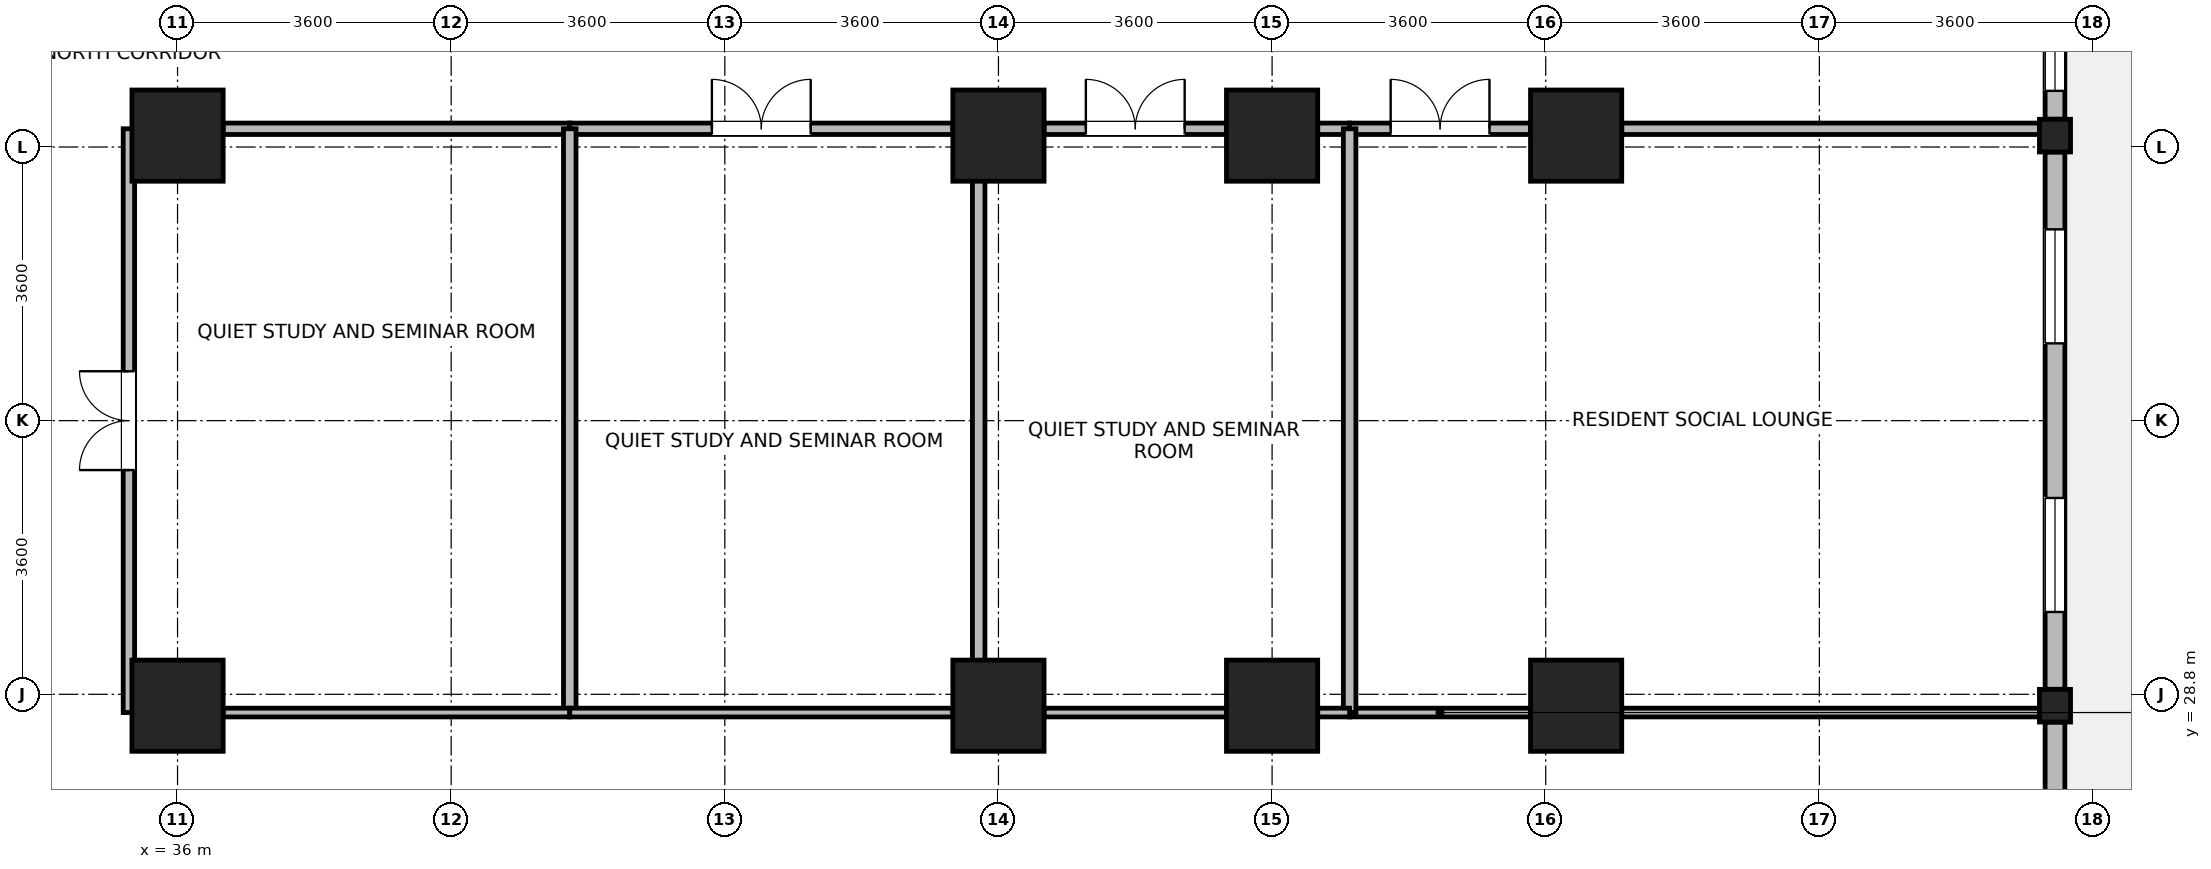
"""IFC4 building model, lengths in metres.
Left out: names, types, materials, properties, quantities, classifications, styles, units other than length and angle.
Written with IfcOpenShell. Run it as: python <this file> out.ifc"""

import sys

from ifc_helpers import new_model, si_unit, direction, frame, frame_2d, origin, origin_2d, place, context, subcontext, project, spatial, rectangle, i_section, extrude, source, transform, mapped, element, fill, save


model = new_model("IFC4")
c1 = context("Model", 3, precision=1e-05, world=origin(), true_north=direction((0.0, 1.0)))
c2 = subcontext(c1, "Body", "Model", "MODEL_VIEW")
j1 = project(units=[si_unit("LENGTHUNIT", "METRE"), si_unit("PLANEANGLEUNIT", "RADIAN")], contexts=[c1])
p1 = place(None, origin())
s1 = spatial("IfcSite", under=j1, at=p1, CompositionType="ELEMENT")
p2 = place(p1, origin())
s2 = spatial("IfcBuilding", under=s1, at=p2, CompositionType="ELEMENT")
p3 = place(p2, frame((0.0, 0.0, 119.3)))
s3 = spatial("IfcBuildingStorey", under=s2, at=p3, CompositionType="ELEMENT", Elevation=119.3)
m1 = source(origin(), c2, "Body", "SweptSolid", [
    extrude(rectangle(XDim=1.2, YDim=1.2, at=origin_2d()), origin(), (0.0, 0.0, 1.0), 3.7),
])
for number, where, z_axis, x_axis in (
    (1, (36.0, 28.65, 0.0), (0.0, 0.0, 1.0), (1.0, 0.0, 0.0)),
    (2, (36.0, 36.15, 0.0), (0.0, 0.0, 1.0), (1.0, 0.0, 0.0)),
    (3, (46.8, 28.65, 0.0), (0.0, 0.0, 1.0), (1.0, 0.0, 0.0)),
    (4, (46.8, 36.15, 0.0), (0.0, 0.0, 1.0), (1.0, 0.0, 0.0)),
    (5, (50.4, 28.65, 0.0), (0.0, 0.0, 1.0), (1.0, 0.0, 0.0)),
    (6, (50.4, 36.15, 0.0), (0.0, 0.0, 1.0), (1.0, 0.0, 0.0)),
    (7, (54.4, 28.65, 0.0), (0.0, 0.0, 1.0), (1.0, 0.0, 0.0)),
    (8, (54.4, 36.15, 0.0), (0.0, 0.0, 1.0), (1.0, 0.0, 0.0)),
):
    element("IfcColumn", number, at=place(p3, frame(where, z_axis=z_axis, x_axis=x_axis)), inside=s3, PredefinedType="COLUMN", context=c2, shape_type="MappedRepresentation", body=[
        mapped(m1, transform((0.0, 0.0, 0.0), x_axis=(1.0, 0.0, 0.0), y_axis=(0.0, 1.0, 0.0), z_axis=(0.0, 0.0, 1.0), scale=1.0)),
    ])
m2 = source(origin(), c2, "Body", "SweptSolid", [
    extrude(i_section(OverallWidth=0.409, OverallDepth=0.43, WebThickness=0.024, FlangeThickness=0.033, FilletRadius=0.015, at=origin_2d()), origin(), (0.0, 0.0, 1.0), 3.7),
])
for number, where, z_axis, x_axis in (
    (9, (60.7, 28.65, 0.0), (0.0, 0.0, 1.0), (1.0, 0.0, 0.0)),
    (10, (60.7, 36.15, 0.0), (0.0, 0.0, 1.0), (1.0, 0.0, 0.0)),
):
    element("IfcColumn", number, at=place(p3, frame(where, z_axis=z_axis, x_axis=x_axis)), inside=s3, PredefinedType="COLUMN", context=c2, shape_type="MappedRepresentation", body=[
        mapped(m2, transform((0.0, 0.0, 0.0), x_axis=(1.0, 0.0, 0.0), y_axis=(0.0, 1.0, 0.0), z_axis=(0.0, 0.0, 1.0), scale=1.0)),
    ])
p4 = place(p3, frame((60.7, 28.434, 0.0), z_axis=(0.0, 0.0, 1.0), x_axis=(0.0, -1.0, 0.0)))
e11 = element("IfcWall", 11, at=p4, inside=s3, PredefinedType="STANDARD", context=c2, shape_type="SweptSolid", body=[
    extrude(rectangle(XDim=6.618, YDim=0.26, at=frame_2d((3.309, 0.0))), origin(), (0.0, 0.0, 1.0), 2.98),
])
p5 = place(p4, frame((4.213, 0.0, 0.85)))
e12 = element("IfcOpeningElement", 12, at=p5, cuts=e11, PredefinedType="OPENING", context=c2, shape_type="SweptSolid", body=[
    extrude(rectangle(XDim=1.5, YDim=1.85, at=frame_2d((0.75, 0.925))), frame((0.0, 0.14, 0.0), z_axis=(0.0, -1.0, 0.0), x_axis=(1.0, 0.0, 0.0)), (0.0, 0.0, 1.0), 0.28),
])
p6 = place(p4, frame((2.834, 0.0, 0.85)))
e13 = element("IfcOpeningElement", 13, at=p6, cuts=e11, PredefinedType="OPENING", context=c2, shape_type="SweptSolid", body=[
    extrude(rectangle(XDim=0.95, YDim=1.75, at=frame_2d((0.475, 0.875))), frame((0.0, 0.14, 0.0), z_axis=(0.0, -1.0, 0.0), x_axis=(1.0, 0.0, 0.0)), (0.0, 0.0, 1.0), 0.28),
])
p7 = place(p3, frame((60.7, 35.934, 0.0), z_axis=(0.0, 0.0, 1.0), x_axis=(0.0, -1.0, 0.0)))
e14 = element("IfcWall", 14, at=p7, inside=s3, PredefinedType="STANDARD", context=c2, shape_type="SweptSolid", body=[
    extrude(rectangle(XDim=7.068, YDim=0.26, at=frame_2d((3.534, 0.0))), origin(), (0.0, 0.0, 1.0), 2.98),
])
p8 = place(p7, frame((1.017, 0.0, 0.85)))
e15 = element("IfcOpeningElement", 15, at=p8, cuts=e14, PredefinedType="OPENING", context=c2, shape_type="SweptSolid", body=[
    extrude(rectangle(XDim=1.5, YDim=1.85, at=frame_2d((0.75, 0.925))), frame((0.0, 0.14, 0.0), z_axis=(0.0, -1.0, 0.0), x_axis=(1.0, 0.0, 0.0)), (0.0, 0.0, 1.0), 0.28),
])
p9 = place(p7, frame((4.551, 0.0, 0.85)))
e16 = element("IfcOpeningElement", 16, at=p9, cuts=e14, PredefinedType="OPENING", context=c2, shape_type="SweptSolid", body=[
    extrude(rectangle(XDim=1.5, YDim=1.85, at=frame_2d((0.75, 0.925))), frame((0.0, 0.14, 0.0), z_axis=(0.0, -1.0, 0.0), x_axis=(1.0, 0.0, 0.0)), (0.0, 0.0, 1.0), 0.28),
])
p10 = place(p3, frame((60.7, 39.73, 0.0), z_axis=(0.0, 0.0, 1.0), x_axis=(0.0, -1.0, 0.0)))
e17 = element("IfcWall", 17, at=p10, inside=s3, PredefinedType="STANDARD", context=c2, shape_type="SweptSolid", body=[
    extrude(rectangle(XDim=3.364, YDim=0.26, at=frame_2d((1.682, 0.0))), origin(), (0.0, 0.0, 1.0), 3.43),
])
p11 = place(p10, frame((2.041, 0.0, 0.85)))
e18 = element("IfcOpeningElement", 18, at=p11, cuts=e17, PredefinedType="OPENING", context=c2, shape_type="SweptSolid", body=[
    extrude(rectangle(XDim=0.95, YDim=1.75, at=frame_2d((0.475, 0.875))), frame((0.0, 0.14, 0.0), z_axis=(0.0, -1.0, 0.0), x_axis=(1.0, 0.0, 0.0)), (0.0, 0.0, 1.0), 0.28),
])
p12 = place(p10, frame((0.265, 0.0, 0.85)))
e19 = element("IfcOpeningElement", 19, at=p12, cuts=e17, PredefinedType="OPENING", context=c2, shape_type="SweptSolid", body=[
    extrude(rectangle(XDim=0.95, YDim=1.75, at=frame_2d((0.475, 0.875))), frame((0.0, 0.14, 0.0), z_axis=(0.0, -1.0, 0.0), x_axis=(1.0, 0.0, 0.0)), (0.0, 0.0, 1.0), 0.28),
])
p13 = place(p3, frame((51.42, 36.24, 0.0), z_axis=(0.0, 0.0, 1.0), x_axis=(1.0, 0.0, 0.0)))
e20 = element("IfcWall", 20, at=p13, inside=s3, PredefinedType="PARTITIONING", context=c2, shape_type="SweptSolid", body=[
    extrude(rectangle(XDim=2.38, YDim=0.15, at=frame_2d((1.19, 0.0))), origin(), (0.0, 0.0, 1.0), 2.78),
])
p14 = place(p13, frame((0.54, 0.0, 0.0)))
e21 = element("IfcOpeningElement", 21, at=p14, cuts=e20, PredefinedType="OPENING", context=c2, shape_type="SweptSolid", body=[
    extrude(rectangle(XDim=1.3, YDim=2.12, at=frame_2d((0.65, 1.06))), frame((0.0, 0.085, 0.0), z_axis=(0.0, -1.0, 0.0), x_axis=(1.0, 0.0, 0.0)), (0.0, 0.0, 1.0), 0.17),
])
p15 = place(p3, frame((55.0, 36.24, 0.0), z_axis=(0.0, 0.0, 1.0), x_axis=(1.0, 0.0, 0.0)))
e22 = element("IfcWall", 22, at=p15, inside=s3, PredefinedType="PARTITIONING", context=c2, shape_type="SweptSolid", body=[
    extrude(rectangle(XDim=5.496, YDim=0.15, at=frame_2d((2.748, 0.0))), origin(), (0.0, 0.0, 1.0), 2.78),
])
p16 = place(p3, frame((35.36, 28.56, 0.0), z_axis=(0.0, 0.0, 1.0), x_axis=(0.0, 1.0, 0.0)))
e23 = element("IfcWall", 23, at=p16, inside=s3, PredefinedType="PARTITIONING", context=c2, shape_type="SweptSolid", body=[
    extrude(rectangle(XDim=7.68, YDim=0.15, at=frame_2d((3.84, 0.0))), origin(), (0.0, 0.0, 1.0), 3.43),
])
p17 = place(p16, frame((3.19, 0.0, 0.0)))
e24 = element("IfcOpeningElement", 24, at=p17, cuts=e23, PredefinedType="OPENING", context=c2, shape_type="SweptSolid", body=[
    extrude(rectangle(XDim=1.3, YDim=2.12, at=frame_2d((0.65, 1.06))), frame((0.0, 0.085, 0.0), z_axis=(0.0, -1.0, 0.0), x_axis=(1.0, 0.0, 0.0)), (0.0, 0.0, 1.0), 0.17),
])
p18 = place(p3, frame((36.6, 36.24, 0.0), z_axis=(0.0, 0.0, 1.0), x_axis=(1.0, 0.0, 0.0)))
e25 = element("IfcWall", 25, at=p18, inside=s3, PredefinedType="PARTITIONING", context=c2, shape_type="SweptSolid", body=[
    extrude(rectangle(XDim=4.56, YDim=0.15, at=frame_2d((2.28, 0.0))), origin(), (0.0, 0.0, 1.0), 2.78),
])
p19 = place(p3, frame((41.16, 36.24, 0.0), z_axis=(0.0, 0.0, 1.0), x_axis=(1.0, 0.0, 0.0)))
e26 = element("IfcWall", 26, at=p19, inside=s3, PredefinedType="PARTITIONING", context=c2, shape_type="SweptSolid", body=[
    extrude(rectangle(XDim=5.04, YDim=0.15, at=frame_2d((2.52, 0.0))), origin(), (0.0, 0.0, 1.0), 2.78),
])
p20 = place(p19, frame((1.87, 0.0, 0.0)))
e27 = element("IfcOpeningElement", 27, at=p20, cuts=e26, PredefinedType="OPENING", context=c2, shape_type="SweptSolid", body=[
    extrude(rectangle(XDim=1.3, YDim=2.12, at=frame_2d((0.65, 1.06))), frame((0.0, 0.085, 0.0), z_axis=(0.0, -1.0, 0.0), x_axis=(1.0, 0.0, 0.0)), (0.0, 0.0, 1.0), 0.17),
])
p21 = place(p3, frame((47.4, 36.24, 0.0), z_axis=(0.0, 0.0, 1.0), x_axis=(1.0, 0.0, 0.0)))
e28 = element("IfcWall", 28, at=p21, inside=s3, PredefinedType="PARTITIONING", context=c2, shape_type="SweptSolid", body=[
    extrude(rectangle(XDim=2.4, YDim=0.15, at=frame_2d((1.2, 0.0))), origin(), (0.0, 0.0, 1.0), 2.78),
])
p22 = place(p21, frame((0.55, 0.0, 0.0)))
e29 = element("IfcOpeningElement", 29, at=p22, cuts=e28, PredefinedType="OPENING", context=c2, shape_type="SweptSolid", body=[
    extrude(rectangle(XDim=1.3, YDim=2.12, at=frame_2d((0.65, 1.06))), frame((0.0, 0.085, 0.0), z_axis=(0.0, -1.0, 0.0), x_axis=(1.0, 0.0, 0.0)), (0.0, 0.0, 1.0), 0.17),
])
p23 = place(p3, frame((51.0, 36.24, 0.0), z_axis=(0.0, 0.0, 1.0), x_axis=(1.0, 0.0, 0.0)))
e30 = element("IfcWall", 30, at=p23, inside=s3, PredefinedType="PARTITIONING", context=c2, shape_type="SweptSolid", body=[
    extrude(rectangle(XDim=0.42, YDim=0.15, at=frame_2d((0.21, 0.0))), origin(), (0.0, 0.0, 1.0), 2.78),
])
p24 = place(p3, frame((51.42, 28.56, 0.0), z_axis=(0.0, 0.0, 1.0), x_axis=(1.0, 0.0, 0.0)))
e31 = element("IfcWall", 31, at=p24, inside=s3, PredefinedType="PARTITIONING", context=c2, shape_type="SweptSolid", body=[
    extrude(rectangle(XDim=2.38, YDim=0.115, at=frame_2d((1.19, 0.0))), origin(), (0.0, 0.0, 1.0), 2.78),
])
p25 = place(p3, frame((55.0, 28.56, 0.0), z_axis=(0.0, 0.0, 1.0), x_axis=(1.0, 0.0, 0.0)))
e32 = element("IfcWall", 32, at=p25, inside=s3, PredefinedType="PARTITIONING", context=c2, shape_type="SweptSolid", body=[
    extrude(rectangle(XDim=5.496, YDim=0.115, at=frame_2d((2.748, 0.0))), origin(), (0.0, 0.0, 1.0), 2.78),
])
for number, where, z_axis, x_axis in (
    (33, (41.16, 28.56, 0.0), (0.0, 0.0, 1.0), (0.0, 1.0, 0.0)),
    (34, (46.54, 28.56, 0.0), (0.0, 0.0, 1.0), (0.0, 1.0, 0.0)),
    (35, (51.42, 28.56, 0.0), (0.0, 0.0, 1.0), (0.0, 1.0, 0.0)),
):
    element("IfcWall", number, at=place(p3, frame(where, z_axis=z_axis, x_axis=x_axis)), inside=s3, PredefinedType="PARTITIONING", context=c2, shape_type="SweptSolid", body=[
        extrude(rectangle(XDim=7.68, YDim=0.165, at=frame_2d((3.84, 0.0))), origin(), (0.0, 0.0, 1.0), 3.43),
    ])
p26 = place(p3, frame((36.6, 28.56, 0.0), z_axis=(0.0, 0.0, 1.0), x_axis=(1.0, 0.0, 0.0)))
e36 = element("IfcWall", 36, at=p26, inside=s3, PredefinedType="PARTITIONING", context=c2, shape_type="SweptSolid", body=[
    extrude(rectangle(XDim=4.56, YDim=0.115, at=frame_2d((2.28, 0.0))), origin(), (0.0, 0.0, 1.0), 2.78),
])
p27 = place(p3, frame((41.16, 28.56, 0.0), z_axis=(0.0, 0.0, 1.0), x_axis=(1.0, 0.0, 0.0)))
e37 = element("IfcWall", 37, at=p27, inside=s3, PredefinedType="PARTITIONING", context=c2, shape_type="SweptSolid", body=[
    extrude(rectangle(XDim=5.04, YDim=0.115, at=frame_2d((2.52, 0.0))), origin(), (0.0, 0.0, 1.0), 2.78),
])
p28 = place(p3, frame((47.4, 28.56, 0.0), z_axis=(0.0, 0.0, 1.0), x_axis=(1.0, 0.0, 0.0)))
e38 = element("IfcWall", 38, at=p28, inside=s3, PredefinedType="PARTITIONING", context=c2, shape_type="SweptSolid", body=[
    extrude(rectangle(XDim=2.4, YDim=0.115, at=frame_2d((1.2, 0.0))), origin(), (0.0, 0.0, 1.0), 2.78),
])
p29 = place(p3, frame((51.0, 28.56, 0.0), z_axis=(0.0, 0.0, 1.0), x_axis=(1.0, 0.0, 0.0)))
e39 = element("IfcWall", 39, at=p29, inside=s3, PredefinedType="PARTITIONING", context=c2, shape_type="SweptSolid", body=[
    extrude(rectangle(XDim=0.42, YDim=0.115, at=frame_2d((0.21, 0.0))), origin(), (0.0, 0.0, 1.0), 2.78),
])
p30 = place(p8, origin())
e40 = element("IfcWindow", 40, at=p30, inside=s3, PartitioningType="SINGLE_PANEL", PredefinedType="WINDOW", context=c2, shape_type="SweptSolid", body=[
    extrude(rectangle(XDim=1.5, YDim=1.85, at=frame_2d((0.75, 0.925))), frame((0.0, 0.03, 0.0), z_axis=(0.0, -1.0, 0.0), x_axis=(1.0, 0.0, 0.0)), (0.0, 0.0, 1.0), 0.06),
])
fill(e15, e40)
p31 = place(p9, origin())
e41 = element("IfcWindow", 41, at=p31, inside=s3, PartitioningType="SINGLE_PANEL", PredefinedType="WINDOW", context=c2, shape_type="SweptSolid", body=[
    extrude(rectangle(XDim=1.5, YDim=1.85, at=frame_2d((0.75, 0.925))), frame((0.0, 0.03, 0.0), z_axis=(0.0, -1.0, 0.0), x_axis=(1.0, 0.0, 0.0)), (0.0, 0.0, 1.0), 0.06),
])
fill(e16, e41)
p32 = place(p11, origin())
e42 = element("IfcWindow", 42, at=p32, inside=s3, PartitioningType="SINGLE_PANEL", PredefinedType="WINDOW", context=c2, shape_type="SweptSolid", body=[
    extrude(rectangle(XDim=0.95, YDim=1.75, at=frame_2d((0.475, 0.875))), frame((0.0, 0.03, 0.0), z_axis=(0.0, -1.0, 0.0), x_axis=(1.0, 0.0, 0.0)), (0.0, 0.0, 1.0), 0.06),
])
fill(e18, e42)
p33 = place(p14, origin())
e43 = element("IfcDoor", 43, at=p33, inside=s3, OperationType="DOUBLE_DOOR_SINGLE_SWING", PredefinedType="DOOR", context=c2, shape_type="SweptSolid", body=[
    extrude(rectangle(XDim=1.3, YDim=2.12, at=frame_2d((0.65, 1.06))), frame((0.0, 0.025, 0.0), z_axis=(0.0, -1.0, 0.0), x_axis=(1.0, 0.0, 0.0)), (0.0, 0.0, 1.0), 0.05),
])
fill(e21, e43)
p34 = place(p17, origin())
e44 = element("IfcDoor", 44, at=p34, inside=s3, OperationType="DOUBLE_DOOR_SINGLE_SWING", PredefinedType="DOOR", context=c2, shape_type="SweptSolid", body=[
    extrude(rectangle(XDim=1.3, YDim=2.12, at=frame_2d((0.65, 1.06))), frame((0.0, 0.025, 0.0), z_axis=(0.0, -1.0, 0.0), x_axis=(1.0, 0.0, 0.0)), (0.0, 0.0, 1.0), 0.05),
])
fill(e24, e44)
p35 = place(p20, origin())
e45 = element("IfcDoor", 45, at=p35, inside=s3, OperationType="DOUBLE_DOOR_SINGLE_SWING", PredefinedType="DOOR", context=c2, shape_type="SweptSolid", body=[
    extrude(rectangle(XDim=1.3, YDim=2.12, at=frame_2d((0.65, 1.06))), frame((0.0, 0.025, 0.0), z_axis=(0.0, -1.0, 0.0), x_axis=(1.0, 0.0, 0.0)), (0.0, 0.0, 1.0), 0.05),
])
fill(e27, e45)
p36 = place(p22, origin())
e46 = element("IfcDoor", 46, at=p36, inside=s3, OperationType="DOUBLE_DOOR_SINGLE_SWING", PredefinedType="DOOR", context=c2, shape_type="SweptSolid", body=[
    extrude(rectangle(XDim=1.3, YDim=2.12, at=frame_2d((0.65, 1.06))), frame((0.0, 0.025, 0.0), z_axis=(0.0, -1.0, 0.0), x_axis=(1.0, 0.0, 0.0)), (0.0, 0.0, 1.0), 0.05),
])
fill(e29, e46)
save(model, sys.argv[1])
